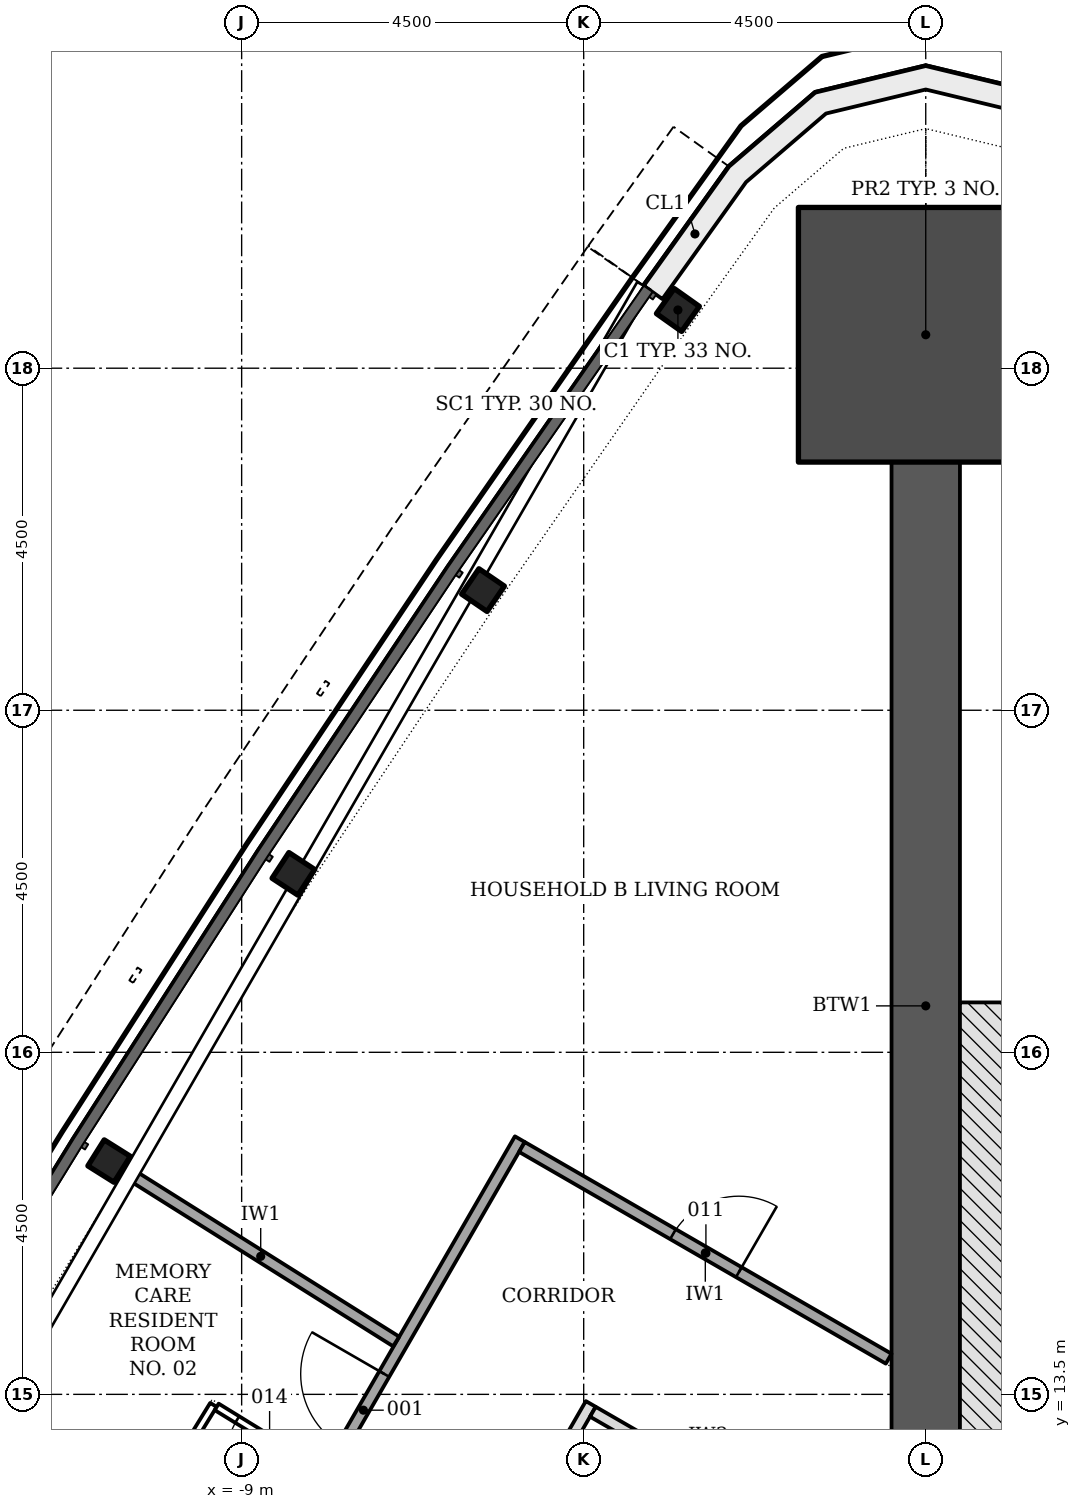
"""IFC4 building model, lengths in metres.
Left out: names, types, materials, properties, quantities, classifications, styles, units other than length and angle.
Written with IfcOpenShell. Run it as: python <this file> out.ifc"""

import sys

from ifc_helpers import new_model, si_unit, direction, frame, frame_2d, origin, origin_2d, place, context, subcontext, project, spatial, polyline, rectangle, i_section, outline, extrude, element, fill, save


model = new_model("IFC4")
c1 = context("Model", 3, precision=1e-05, world=origin(), true_north=direction((0.0, 1.0)))
c2 = subcontext(c1, "Body", "Model", "MODEL_VIEW")
j1 = project(units=[si_unit("LENGTHUNIT", "METRE"), si_unit("PLANEANGLEUNIT", "RADIAN")], contexts=[c1])
p1 = place(None, origin())
s1 = spatial("IfcSite", under=j1, at=p1, CompositionType="ELEMENT")
p2 = place(p1, origin())
s2 = spatial("IfcBuilding", under=s1, at=p2, CompositionType="ELEMENT")
p3 = place(p2, frame((0.0, 0.0, 34.8)))
s3 = spatial("IfcBuildingStorey", under=s2, at=p3, CompositionType="ELEMENT", Elevation=34.8)
p4 = place(p3, frame((0.0, 11.456, -0.2), z_axis=(0.0, 0.0, 1.0), x_axis=(0.0, 1.0, 0.0)))
e1 = element("IfcWall", 1, at=p4, inside=s3, PredefinedType="SHEAR", context=c2, shape_type="SweptSolid", body=[
    extrude(rectangle(XDim=14.309, YDim=0.9, at=frame_2d((7.154, 0.0))), origin(), (0.0, 0.0, 1.0), 3.6),
])
p5 = place(p3, frame((0.0, 27.44, -0.2), z_axis=(0.0, 0.0, 1.0), x_axis=(0.0, 1.0, 0.0)))
e2 = element("IfcColumn", 2, at=p5, inside=s3, PredefinedType="COLUMN", context=c2, shape_type="SweptSolid", body=[
    extrude(rectangle(XDim=3.35, YDim=3.35, at=origin_2d()), origin(), (0.0, 0.0, 1.0), 3.6),
])
for number, where, z_axis, x_axis in (
    (3, (-3.26, 27.766, -0.2), (0.0, 0.0, 1.0), (-0.579, -0.815, 0.0)),
    (4, (-5.825, 24.081, -0.2), (0.0, 0.0, 1.0), (-0.563, -0.826, 0.0)),
    (5, (-8.319, 20.348, -0.2), (0.0, 0.0, 1.0), (-0.548, -0.837, 0.0)),
    (6, (-10.744, 16.569, -0.2), (0.0, 0.0, 1.0), (-0.532, -0.847, 0.0)),
):
    element("IfcColumn", number, at=place(p3, frame(where, z_axis=z_axis, x_axis=x_axis)), inside=s3, PredefinedType="COLUMN", context=c2, shape_type="SweptSolid", body=[
        extrude(i_section(OverallWidth=0.404, OverallDepth=0.406, WebThickness=0.027, FlangeThickness=0.044, FilletRadius=0.015, at=origin_2d()), origin(), (0.0, 0.0, 1.0), 3.6),
    ])
p6 = place(p3, origin())
e7 = element("IfcWall", 7, at=p6, inside=s3, PredefinedType="NOTDEFINED", context=c2, shape_type="SweptSolid", body=[
    extrude(outline(polyline([(3.709, 28.084), (2.586, 29.652), (1.453, 30.625), (0.0, 30.975), (-1.453, 30.625), (-2.586, 29.652), (-3.709, 28.084), (-3.465, 27.91), (-2.364, 29.448), (-1.312, 30.351), (0.0, 30.667), (1.312, 30.351), (2.364, 29.448), (3.465, 27.91), (3.709, 28.084)])), origin(), (0.0, 0.0, 1.0), 3.3),
])
p7 = place(p3, frame((1.018, 11.456, -0.2), z_axis=(0.0, 0.0, 1.0), x_axis=(0.0, 1.0, 0.0)))
e8 = element("IfcWall", 8, at=p7, inside=s3, PredefinedType="SHEAR", context=c2, shape_type="SweptSolid", body=[
    extrude(rectangle(XDim=7.2, YDim=1.136, at=frame_2d((3.6, 0.0))), origin(), (0.0, 0.0, 1.0), 3.6),
])
p8 = place(p3, frame((-17.208, -3.699, 0.0), z_axis=(0.0, 0.0, 1.0), x_axis=(0.499997567621, 0.866026808115, 0.0)))
e9 = element("IfcWall", 9, at=p8, inside=s3, PredefinedType="PARTITIONING", context=c2, shape_type="SweptSolid", body=[
    extrude(rectangle(XDim=23.736, YDim=0.15, at=frame_2d((11.868, 0.0))), origin(), (0.0, 0.0, 1.0), 2.768),
])
p9 = place(p8, frame((19.07, 0.0, 0.0)))
e10 = element("IfcOpeningElement", 10, at=p9, cuts=e9, PredefinedType="OPENING", context=c2, shape_type="SweptSolid", body=[
    extrude(rectangle(XDim=1.1, YDim=2.1, at=frame_2d((0.55, 1.05))), frame((0.0, 0.085, 0.0), z_axis=(0.0, -1.0, 0.0), x_axis=(1.0, 0.0, 0.0)), (0.0, 0.0, 1.0), 0.17),
])
p10 = place(p8, frame((7.225, 0.0, 0.0)))
e11 = element("IfcOpeningElement", 11, at=p10, cuts=e9, PredefinedType="OPENING", context=c2, shape_type="SweptSolid", body=[
    extrude(rectangle(XDim=1.5, YDim=2.1, at=frame_2d((0.75, 1.05))), frame((0.0, 0.085, 0.0), z_axis=(0.0, -1.0, 0.0), x_axis=(1.0, 0.0, 0.0)), (0.0, 0.0, 1.0), 0.17),
])
p11 = place(p3, frame((-4.407, 13.374, 0.0), z_axis=(0.0, 0.0, 1.0), x_axis=(-0.499997181693, -0.866027030928, 0.0)))
e12 = element("IfcWall", 12, at=p11, inside=s3, PredefinedType="PARTITIONING", context=c2, shape_type="SweptSolid", body=[
    extrude(rectangle(XDim=16.77, YDim=0.15, at=frame_2d((8.385, 0.0))), origin(), (0.0, 0.0, 1.0), 2.768),
])
p12 = place(p11, frame((8.879, 0.0, 0.0)))
e13 = element("IfcOpeningElement", 13, at=p12, cuts=e12, PredefinedType="OPENING", context=c2, shape_type="SweptSolid", body=[
    extrude(rectangle(XDim=1.0, YDim=2.1, at=frame_2d((0.5, 1.05))), frame((0.0, 0.085, 0.0), z_axis=(0.0, -1.0, 0.0), x_axis=(1.0, 0.0, 0.0)), (0.0, 0.0, 1.0), 0.17),
])
p13 = place(p3, frame((-5.312, 16.755, 0.0), z_axis=(0.0, 0.0, 1.0), x_axis=(0.866028693448, -0.499994302092, 0.0)))
e14 = element("IfcWall", 14, at=p13, inside=s3, PredefinedType="PARTITIONING", context=c2, shape_type="SweptSolid", body=[
    extrude(rectangle(XDim=5.571, YDim=0.15, at=frame_2d((2.786, 0.0))), origin(), (0.0, 0.0, 1.0), 3.4),
])
p14 = place(p13, frame((2.295, 0.0, 0.0)))
e15 = element("IfcOpeningElement", 15, at=p14, cuts=e14, PredefinedType="OPENING", context=c2, shape_type="SweptSolid", body=[
    extrude(rectangle(XDim=1.0, YDim=2.1, at=frame_2d((0.5, 1.05))), frame((0.0, 0.085, 0.0), z_axis=(0.0, -1.0, 0.0), x_axis=(1.0, 0.0, 0.0)), (0.0, 0.0, 1.0), 0.17),
])
p15 = place(p3, frame((-4.379, 13.271, 0.0), z_axis=(0.0, 0.0, 1.0), x_axis=(0.866019471182, -0.500010275428, 0.0)))
e16 = element("IfcWall", 16, at=p15, inside=s3, PredefinedType="PARTITIONING", context=c2, shape_type="SweptSolid", body=[
    extrude(rectangle(XDim=3.5, YDim=0.15, at=frame_2d((1.75, 0.0))), origin(), (0.0, 0.0, 1.0), 3.4),
])
p16 = place(p3, frame((-10.532, 16.436, 0.0), z_axis=(0.0, 0.0, 1.0), x_axis=(0.846689538327, -0.532087235036, 0.0)))
e17 = element("IfcWall", 17, at=p16, inside=s3, PredefinedType="PARTITIONING", context=c2, shape_type="SweptSolid", body=[
    extrude(rectangle(XDim=4.211, YDim=0.15, at=frame_2d((2.105, 0.0))), origin(), (0.0, 0.0, 1.0), 2.778),
])
p17 = place(p3, frame((-10.616, 11.339, 0.0), z_axis=(0.0, 0.0, 1.0), x_axis=(0.524137571403, 0.85163361033, 0.0)))
e18 = element("IfcWall", 18, at=p17, inside=s3, PredefinedType="PARTITIONING", context=c2, shape_type="SweptSolid", body=[
    extrude(rectangle(XDim=2.375, YDim=0.1, at=frame_2d((1.188, 0.0))), origin(), (0.0, 0.0, 1.0), 2.768),
])
p18 = place(p3, frame((-7.951, 12.488, 0.0), z_axis=(0.0, 0.0, 1.0), x_axis=(-0.851658316705, 0.524097425664, 0.0)))
e19 = element("IfcWall", 19, at=p18, inside=s3, PredefinedType="PARTITIONING", context=c2, shape_type="SweptSolid", body=[
    extrude(rectangle(XDim=1.617, YDim=0.1, at=frame_2d((0.809, 0.0))), origin(), (0.0, 0.0, 1.0), 3.4),
])
p19 = place(p18, frame((0.3, 0.0, 0.0)))
e20 = element("IfcOpeningElement", 20, at=p19, cuts=e19, PredefinedType="OPENING", context=c2, shape_type="SweptSolid", body=[
    extrude(rectangle(XDim=1.0, YDim=2.1, at=frame_2d((0.5, 1.05))), frame((0.0, 0.06, 0.0), z_axis=(0.0, -1.0, 0.0), x_axis=(1.0, 0.0, 0.0)), (0.0, 0.0, 1.0), 0.12),
])
p20 = place(p9, origin())
e21 = element("IfcDoor", 21, at=p20, inside=s3, OperationType="SINGLE_SWING_RIGHT", PredefinedType="DOOR", context=c2, shape_type="SweptSolid", body=[
    extrude(rectangle(XDim=1.1, YDim=2.1, at=frame_2d((0.55, 1.05))), frame((0.0, 0.025, 0.0), z_axis=(0.0, -1.0, 0.0), x_axis=(1.0, 0.0, 0.0)), (0.0, 0.0, 1.0), 0.05),
])
fill(e10, e21)
p21 = place(p14, origin())
e22 = element("IfcDoor", 22, at=p21, inside=s3, OperationType="SINGLE_SWING_RIGHT", PredefinedType="DOOR", context=c2, shape_type="SweptSolid", body=[
    extrude(rectangle(XDim=1.0, YDim=2.1, at=frame_2d((0.5, 1.05))), frame((0.0, 0.025, 0.0), z_axis=(0.0, -1.0, 0.0), x_axis=(1.0, 0.0, 0.0)), (0.0, 0.0, 1.0), 0.05),
])
fill(e15, e22)
p22 = place(p19, origin())
e23 = element("IfcDoor", 23, at=p22, inside=s3, OperationType="SINGLE_SWING_LEFT", PredefinedType="DOOR", context=c2, shape_type="SweptSolid", body=[
    extrude(rectangle(XDim=1.0, YDim=2.1, at=frame_2d((0.5, 1.05))), frame((0.0, 0.025, 0.0), z_axis=(0.0, -1.0, 0.0), x_axis=(1.0, 0.0, 0.0)), (0.0, 0.0, 1.0), 0.05),
])
fill(e20, e23)
save(model, sys.argv[1])
